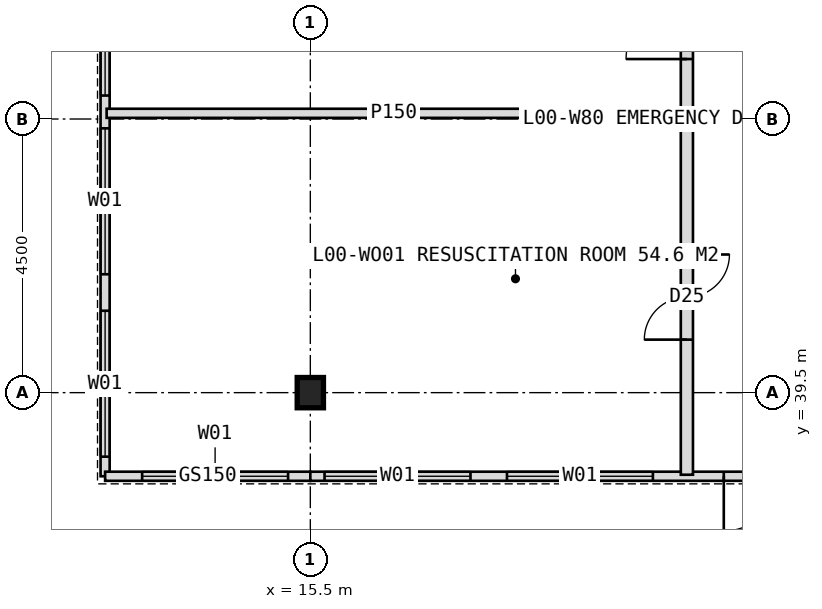
"""IFC4 building model, lengths in metres.
Left out: names, types, materials, properties, quantities, classifications, styles, units other than length and angle.
Written with IfcOpenShell. Run it as: python <this file> out.ifc"""

import sys

from ifc_helpers import new_model, si_unit, direction, frame, frame_2d, origin, origin_2d, place, context, subcontext, project, spatial, rectangle, i_section, extrude, element, fill, save


model = new_model("IFC4")
c1 = context("Model", 3, precision=1e-05, world=origin(), true_north=direction((0.0, 1.0)))
c2 = subcontext(c1, "Body", "Model", "MODEL_VIEW")
j1 = project(units=[si_unit("LENGTHUNIT", "METRE"), si_unit("PLANEANGLEUNIT", "RADIAN")], contexts=[c1])
p1 = place(None, origin())
s1 = spatial("IfcSite", under=j1, at=p1, CompositionType="ELEMENT")
p2 = place(p1, origin())
s2 = spatial("IfcBuilding", under=s1, at=p2, CompositionType="ELEMENT")
p3 = place(p2, origin())
s3 = spatial("IfcBuildingStorey", under=s2, at=p3, CompositionType="ELEMENT", Elevation=0.0)
p4 = place(p3, frame((15.5, 39.5, 0.0), z_axis=(0.0, 0.0, 1.0), x_axis=(1.0, 0.0, 0.0)))
e1 = element("IfcColumn", 1, at=p4, inside=s3, PredefinedType="COLUMN", context=c2, shape_type="SweptSolid", body=[
    extrude(i_section(OverallWidth=0.432, OverallDepth=0.498, WebThickness=0.056, FlangeThickness=0.089, FilletRadius=0.015, at=origin_2d()), origin(), (0.0, 0.0, 1.0), 6.0),
])
p5 = place(p3, frame((12.125, 85.875, 0.0), z_axis=(0.0, 0.0, 1.0), x_axis=(0.0, -1.0, 0.0)))
e2 = element("IfcWall", 2, at=p5, inside=s3, PredefinedType="STANDARD", context=c2, shape_type="SweptSolid", body=[
    extrude(rectangle(XDim=47.75, YDim=0.15, at=frame_2d((23.875, 0.0))), origin(), (0.0, 0.0, 1.0), 6.0),
])
p6 = place(p5, frame((22.7, 0.0, 0.0)))
e3 = element("IfcOpeningElement", 3, at=p6, cuts=e2, PredefinedType="OPENING", context=c2, shape_type="SweptSolid", body=[
    extrude(rectangle(XDim=2.4, YDim=2.7, at=frame_2d((1.2, 1.35))), frame((0.0, 0.085, 0.0), z_axis=(0.0, -1.0, 0.0), x_axis=(1.0, 0.0, 0.0)), (0.0, 0.0, 1.0), 0.17),
])
p7 = place(p5, frame((0.306, 0.0, 0.6)))
e4 = element("IfcOpeningElement", 4, at=p7, cuts=e2, PredefinedType="OPENING", context=c2, shape_type="SweptSolid", body=[
    extrude(rectangle(XDim=2.4, YDim=3.0, at=frame_2d((1.2, 1.5))), frame((0.0, 0.085, 0.0), z_axis=(0.0, -1.0, 0.0), x_axis=(1.0, 0.0, 0.0)), (0.0, 0.0, 1.0), 0.17),
])
p8 = place(p5, frame((3.306, 0.0, 0.6)))
e5 = element("IfcOpeningElement", 5, at=p8, cuts=e2, PredefinedType="OPENING", context=c2, shape_type="SweptSolid", body=[
    extrude(rectangle(XDim=2.4, YDim=3.0, at=frame_2d((1.2, 1.5))), frame((0.0, 0.085, 0.0), z_axis=(0.0, -1.0, 0.0), x_axis=(1.0, 0.0, 0.0)), (0.0, 0.0, 1.0), 0.17),
])
p9 = place(p5, frame((6.306, 0.0, 0.6)))
e6 = element("IfcOpeningElement", 6, at=p9, cuts=e2, PredefinedType="OPENING", context=c2, shape_type="SweptSolid", body=[
    extrude(rectangle(XDim=2.4, YDim=3.0, at=frame_2d((1.2, 1.5))), frame((0.0, 0.085, 0.0), z_axis=(0.0, -1.0, 0.0), x_axis=(1.0, 0.0, 0.0)), (0.0, 0.0, 1.0), 0.17),
])
p10 = place(p5, frame((9.306, 0.0, 0.6)))
e7 = element("IfcOpeningElement", 7, at=p10, cuts=e2, PredefinedType="OPENING", context=c2, shape_type="SweptSolid", body=[
    extrude(rectangle(XDim=2.4, YDim=3.0, at=frame_2d((1.2, 1.5))), frame((0.0, 0.085, 0.0), z_axis=(0.0, -1.0, 0.0), x_axis=(1.0, 0.0, 0.0)), (0.0, 0.0, 1.0), 0.17),
])
p11 = place(p5, frame((12.222, 0.0, 0.6)))
e8 = element("IfcOpeningElement", 8, at=p11, cuts=e2, PredefinedType="OPENING", context=c2, shape_type="SweptSolid", body=[
    extrude(rectangle(XDim=2.4, YDim=3.0, at=frame_2d((1.2, 1.5))), frame((0.0, 0.085, 0.0), z_axis=(0.0, -1.0, 0.0), x_axis=(1.0, 0.0, 0.0)), (0.0, 0.0, 1.0), 0.17),
])
p12 = place(p5, frame((15.222, 0.0, 0.6)))
e9 = element("IfcOpeningElement", 9, at=p12, cuts=e2, PredefinedType="OPENING", context=c2, shape_type="SweptSolid", body=[
    extrude(rectangle(XDim=2.4, YDim=3.0, at=frame_2d((1.2, 1.5))), frame((0.0, 0.085, 0.0), z_axis=(0.0, -1.0, 0.0), x_axis=(1.0, 0.0, 0.0)), (0.0, 0.0, 1.0), 0.17),
])
p13 = place(p5, frame((18.198, 0.0, 0.6)))
e10 = element("IfcOpeningElement", 10, at=p13, cuts=e2, PredefinedType="OPENING", context=c2, shape_type="SweptSolid", body=[
    extrude(rectangle(XDim=2.4, YDim=3.0, at=frame_2d((1.2, 1.5))), frame((0.0, 0.085, 0.0), z_axis=(0.0, -1.0, 0.0), x_axis=(1.0, 0.0, 0.0)), (0.0, 0.0, 1.0), 0.17),
])
p14 = place(p5, frame((27.131, 0.0, 0.6)))
e11 = element("IfcOpeningElement", 11, at=p14, cuts=e2, PredefinedType="OPENING", context=c2, shape_type="SweptSolid", body=[
    extrude(rectangle(XDim=2.4, YDim=3.0, at=frame_2d((1.2, 1.5))), frame((0.0, 0.085, 0.0), z_axis=(0.0, -1.0, 0.0), x_axis=(1.0, 0.0, 0.0)), (0.0, 0.0, 1.0), 0.17),
])
p15 = place(p5, frame((30.131, 0.0, 0.6)))
e12 = element("IfcOpeningElement", 12, at=p15, cuts=e2, PredefinedType="OPENING", context=c2, shape_type="SweptSolid", body=[
    extrude(rectangle(XDim=2.4, YDim=3.0, at=frame_2d((1.2, 1.5))), frame((0.0, 0.085, 0.0), z_axis=(0.0, -1.0, 0.0), x_axis=(1.0, 0.0, 0.0)), (0.0, 0.0, 1.0), 0.17),
])
p16 = place(p5, frame((33.125, 0.0, 0.6)))
e13 = element("IfcOpeningElement", 13, at=p16, cuts=e2, PredefinedType="OPENING", context=c2, shape_type="SweptSolid", body=[
    extrude(rectangle(XDim=2.4, YDim=3.0, at=frame_2d((1.2, 1.5))), frame((0.0, 0.085, 0.0), z_axis=(0.0, -1.0, 0.0), x_axis=(1.0, 0.0, 0.0)), (0.0, 0.0, 1.0), 0.17),
])
p17 = place(p5, frame((36.125, 0.0, 0.6)))
e14 = element("IfcOpeningElement", 14, at=p17, cuts=e2, PredefinedType="OPENING", context=c2, shape_type="SweptSolid", body=[
    extrude(rectangle(XDim=2.4, YDim=3.0, at=frame_2d((1.2, 1.5))), frame((0.0, 0.085, 0.0), z_axis=(0.0, -1.0, 0.0), x_axis=(1.0, 0.0, 0.0)), (0.0, 0.0, 1.0), 0.17),
])
p18 = place(p5, frame((39.089, 0.0, 0.6)))
e15 = element("IfcOpeningElement", 15, at=p18, cuts=e2, PredefinedType="OPENING", context=c2, shape_type="SweptSolid", body=[
    extrude(rectangle(XDim=2.4, YDim=3.0, at=frame_2d((1.2, 1.5))), frame((0.0, 0.085, 0.0), z_axis=(0.0, -1.0, 0.0), x_axis=(1.0, 0.0, 0.0)), (0.0, 0.0, 1.0), 0.17),
])
p19 = place(p5, frame((42.028, 0.0, 0.6)))
e16 = element("IfcOpeningElement", 16, at=p19, cuts=e2, PredefinedType="OPENING", context=c2, shape_type="SweptSolid", body=[
    extrude(rectangle(XDim=2.4, YDim=3.0, at=frame_2d((1.2, 1.5))), frame((0.0, 0.085, 0.0), z_axis=(0.0, -1.0, 0.0), x_axis=(1.0, 0.0, 0.0)), (0.0, 0.0, 1.0), 0.17),
])
p20 = place(p5, frame((45.028, 0.0, 0.6)))
e17 = element("IfcOpeningElement", 17, at=p20, cuts=e2, PredefinedType="OPENING", context=c2, shape_type="SweptSolid", body=[
    extrude(rectangle(XDim=2.4, YDim=3.0, at=frame_2d((1.2, 1.5))), frame((0.0, 0.085, 0.0), z_axis=(0.0, -1.0, 0.0), x_axis=(1.0, 0.0, 0.0)), (0.0, 0.0, 1.0), 0.17),
])
p21 = place(p3, frame((12.125, 38.125, 0.0), z_axis=(0.0, 0.0, 1.0), x_axis=(1.0, 0.0, 0.0)))
e18 = element("IfcWall", 18, at=p21, inside=s3, PredefinedType="STANDARD", context=c2, shape_type="SweptSolid", body=[
    extrude(rectangle(XDim=3.375, YDim=0.15, at=frame_2d((1.688, 0.0))), origin(), (0.0, 0.0, 1.0), 6.0),
])
p22 = place(p21, frame((0.609, 0.0, 0.6)))
e19 = element("IfcOpeningElement", 19, at=p22, cuts=e18, PredefinedType="OPENING", context=c2, shape_type="SweptSolid", body=[
    extrude(rectangle(XDim=2.4, YDim=3.0, at=frame_2d((1.2, 1.5))), frame((0.0, 0.085, 0.0), z_axis=(0.0, -1.0, 0.0), x_axis=(1.0, 0.0, 0.0)), (0.0, 0.0, 1.0), 0.17),
])
p23 = place(p3, frame((15.5, 38.125, 0.0), z_axis=(0.0, 0.0, 1.0), x_axis=(1.0, 0.0, 0.0)))
e20 = element("IfcWall", 20, at=p23, inside=s3, PredefinedType="STANDARD", context=c2, shape_type="SweptSolid", body=[
    extrude(rectangle(XDim=18.0, YDim=0.15, at=frame_2d((9.0, 0.0))), origin(), (0.0, 0.0, 1.0), 5.1),
])
p24 = place(p23, frame((6.8, 0.0, 0.0)))
e21 = element("IfcOpeningElement", 21, at=p24, cuts=e20, PredefinedType="OPENING", context=c2, shape_type="SweptSolid", body=[
    extrude(rectangle(XDim=1.8, YDim=2.4, at=frame_2d((0.9, 1.2))), frame((0.0, 0.085, 0.0), z_axis=(0.0, -1.0, 0.0), x_axis=(1.0, 0.0, 0.0)), (0.0, 0.0, 1.0), 0.17),
])
p25 = place(p23, frame((0.234, 0.0, 0.6)))
e22 = element("IfcOpeningElement", 22, at=p25, cuts=e20, PredefinedType="OPENING", context=c2, shape_type="SweptSolid", body=[
    extrude(rectangle(XDim=2.4, YDim=3.0, at=frame_2d((1.2, 1.5))), frame((0.0, 0.085, 0.0), z_axis=(0.0, -1.0, 0.0), x_axis=(1.0, 0.0, 0.0)), (0.0, 0.0, 1.0), 0.17),
])
p26 = place(p23, frame((3.234, 0.0, 0.6)))
e23 = element("IfcOpeningElement", 23, at=p26, cuts=e20, PredefinedType="OPENING", context=c2, shape_type="SweptSolid", body=[
    extrude(rectangle(XDim=2.4, YDim=3.0, at=frame_2d((1.2, 1.5))), frame((0.0, 0.085, 0.0), z_axis=(0.0, -1.0, 0.0), x_axis=(1.0, 0.0, 0.0)), (0.0, 0.0, 1.0), 0.17),
])
p27 = place(p23, frame((15.279, 0.0, 0.6)))
e24 = element("IfcOpeningElement", 24, at=p27, cuts=e20, PredefinedType="OPENING", context=c2, shape_type="SweptSolid", body=[
    extrude(rectangle(XDim=2.4, YDim=3.0, at=frame_2d((1.2, 1.5))), frame((0.0, 0.085, 0.0), z_axis=(0.0, -1.0, 0.0), x_axis=(1.0, 0.0, 0.0)), (0.0, 0.0, 1.0), 0.17),
])
p28 = place(p3, frame((21.693, 38.15, 0.0), z_axis=(0.0, 0.0, 1.0), x_axis=(0.0, 1.0, 0.0)))
e25 = element("IfcWall", 25, at=p28, inside=s3, PredefinedType="PARTITIONING", context=c2, shape_type="SweptSolid", body=[
    extrude(rectangle(XDim=47.7, YDim=0.2, at=frame_2d((23.85, 0.0))), origin(), (0.0, 0.0, 1.0), 5.7),
])
p29 = place(p28, frame((45.7, 0.0, 0.0)))
e26 = element("IfcOpeningElement", 26, at=p29, cuts=e25, PredefinedType="OPENING", context=c2, shape_type="SweptSolid", body=[
    extrude(rectangle(XDim=1.2, YDim=2.1, at=frame_2d((0.6, 1.05))), frame((0.0, 0.11, 0.0), z_axis=(0.0, -1.0, 0.0), x_axis=(1.0, 0.0, 0.0)), (0.0, 0.0, 1.0), 0.22),
])
p30 = place(p28, frame((36.244, 0.0, 0.0)))
e27 = element("IfcOpeningElement", 27, at=p30, cuts=e25, PredefinedType="OPENING", context=c2, shape_type="SweptSolid", body=[
    extrude(rectangle(XDim=1.0, YDim=2.1, at=frame_2d((0.5, 1.05))), frame((0.0, 0.11, 0.0), z_axis=(0.0, -1.0, 0.0), x_axis=(1.0, 0.0, 0.0)), (0.0, 0.0, 1.0), 0.22),
])
p31 = place(p28, frame((2.222, 0.0, 0.0)))
e28 = element("IfcOpeningElement", 28, at=p31, cuts=e25, PredefinedType="OPENING", context=c2, shape_type="SweptSolid", body=[
    extrude(rectangle(XDim=1.4, YDim=2.2, at=frame_2d((0.7, 1.1))), frame((0.0, 0.11, 0.0), z_axis=(0.0, -1.0, 0.0), x_axis=(1.0, 0.0, 0.0)), (0.0, 0.0, 1.0), 0.22),
])
p32 = place(p28, frame((6.836, 0.0, 0.0)))
e29 = element("IfcOpeningElement", 29, at=p32, cuts=e25, PredefinedType="OPENING", context=c2, shape_type="SweptSolid", body=[
    extrude(rectangle(XDim=1.0, YDim=2.1, at=frame_2d((0.5, 1.05))), frame((0.0, 0.11, 0.0), z_axis=(0.0, -1.0, 0.0), x_axis=(1.0, 0.0, 0.0)), (0.0, 0.0, 1.0), 0.22),
])
p33 = place(p28, frame((11.113, 0.0, 0.0)))
e30 = element("IfcOpeningElement", 30, at=p33, cuts=e25, PredefinedType="OPENING", context=c2, shape_type="SweptSolid", body=[
    extrude(rectangle(XDim=1.4, YDim=2.2, at=frame_2d((0.7, 1.1))), frame((0.0, 0.11, 0.0), z_axis=(0.0, -1.0, 0.0), x_axis=(1.0, 0.0, 0.0)), (0.0, 0.0, 1.0), 0.22),
])
p34 = place(p28, frame((17.081, 0.0, 0.0)))
e31 = element("IfcOpeningElement", 31, at=p34, cuts=e25, PredefinedType="OPENING", context=c2, shape_type="SweptSolid", body=[
    extrude(rectangle(XDim=1.4, YDim=2.2, at=frame_2d((0.7, 1.1))), frame((0.0, 0.11, 0.0), z_axis=(0.0, -1.0, 0.0), x_axis=(1.0, 0.0, 0.0)), (0.0, 0.0, 1.0), 0.22),
])
p35 = place(p28, frame((23.05, 0.0, 0.0)))
e32 = element("IfcOpeningElement", 32, at=p35, cuts=e25, PredefinedType="OPENING", context=c2, shape_type="SweptSolid", body=[
    extrude(rectangle(XDim=1.4, YDim=2.2, at=frame_2d((0.7, 1.1))), frame((0.0, 0.11, 0.0), z_axis=(0.0, -1.0, 0.0), x_axis=(1.0, 0.0, 0.0)), (0.0, 0.0, 1.0), 0.22),
])
p36 = place(p28, frame((27.527, 0.0, 0.0)))
e33 = element("IfcOpeningElement", 33, at=p36, cuts=e25, PredefinedType="OPENING", context=c2, shape_type="SweptSolid", body=[
    extrude(rectangle(XDim=1.4, YDim=2.2, at=frame_2d((0.7, 1.1))), frame((0.0, 0.11, 0.0), z_axis=(0.0, -1.0, 0.0), x_axis=(1.0, 0.0, 0.0)), (0.0, 0.0, 1.0), 0.22),
])
p37 = place(p28, frame((32.203, 0.0, 0.0)))
e34 = element("IfcOpeningElement", 34, at=p37, cuts=e25, PredefinedType="OPENING", context=c2, shape_type="SweptSolid", body=[
    extrude(rectangle(XDim=1.0, YDim=2.1, at=frame_2d((0.5, 1.05))), frame((0.0, 0.11, 0.0), z_axis=(0.0, -1.0, 0.0), x_axis=(1.0, 0.0, 0.0)), (0.0, 0.0, 1.0), 0.22),
])
p38 = place(p3, frame((12.15, 44.094, 0.0), z_axis=(0.0, 0.0, 1.0), x_axis=(1.0, 0.0, 0.0)))
e35 = element("IfcWall", 35, at=p38, inside=s3, PredefinedType="PARTITIONING", context=c2, shape_type="SweptSolid", body=[
    extrude(rectangle(XDim=9.443, YDim=0.15, at=frame_2d((4.722, 0.0))), origin(), (0.0, 0.0, 1.0), 5.7),
])
p39 = place(p18, origin())
e36 = element("IfcWindow", 36, at=p39, inside=s3, PartitioningType="SINGLE_PANEL", PredefinedType="WINDOW", context=c2, shape_type="SweptSolid", body=[
    extrude(rectangle(XDim=2.4, YDim=3.0, at=frame_2d((1.2, 1.5))), frame((0.0, 0.03, 0.0), z_axis=(0.0, -1.0, 0.0), x_axis=(1.0, 0.0, 0.0)), (0.0, 0.0, 1.0), 0.06),
])
fill(e15, e36)
p40 = place(p19, origin())
e37 = element("IfcWindow", 37, at=p40, inside=s3, PartitioningType="SINGLE_PANEL", PredefinedType="WINDOW", context=c2, shape_type="SweptSolid", body=[
    extrude(rectangle(XDim=2.4, YDim=3.0, at=frame_2d((1.2, 1.5))), frame((0.0, 0.03, 0.0), z_axis=(0.0, -1.0, 0.0), x_axis=(1.0, 0.0, 0.0)), (0.0, 0.0, 1.0), 0.06),
])
fill(e16, e37)
p41 = place(p20, origin())
e38 = element("IfcWindow", 38, at=p41, inside=s3, PartitioningType="SINGLE_PANEL", PredefinedType="WINDOW", context=c2, shape_type="SweptSolid", body=[
    extrude(rectangle(XDim=2.4, YDim=3.0, at=frame_2d((1.2, 1.5))), frame((0.0, 0.03, 0.0), z_axis=(0.0, -1.0, 0.0), x_axis=(1.0, 0.0, 0.0)), (0.0, 0.0, 1.0), 0.06),
])
fill(e17, e38)
p42 = place(p24, frame((1.8, 0.0, 0.0), z_axis=(0.0, 0.0, 1.0), x_axis=(-1.0, 0.0, 0.0)))
e39 = element("IfcDoor", 39, at=p42, inside=s3, OperationType="DOUBLE_DOOR_SINGLE_SWING", PredefinedType="DOOR", context=c2, shape_type="SweptSolid", body=[
    extrude(rectangle(XDim=1.8, YDim=2.4, at=frame_2d((0.9, 1.2))), frame((0.0, 0.025, 0.0), z_axis=(0.0, -1.0, 0.0), x_axis=(1.0, 0.0, 0.0)), (0.0, 0.0, 1.0), 0.05),
])
fill(e21, e39)
p43 = place(p22, origin())
e40 = element("IfcWindow", 40, at=p43, inside=s3, PartitioningType="SINGLE_PANEL", PredefinedType="WINDOW", context=c2, shape_type="SweptSolid", body=[
    extrude(rectangle(XDim=2.4, YDim=3.0, at=frame_2d((1.2, 1.5))), frame((0.0, 0.03, 0.0), z_axis=(0.0, -1.0, 0.0), x_axis=(1.0, 0.0, 0.0)), (0.0, 0.0, 1.0), 0.06),
])
fill(e19, e40)
p44 = place(p25, origin())
e41 = element("IfcWindow", 41, at=p44, inside=s3, PartitioningType="SINGLE_PANEL", PredefinedType="WINDOW", context=c2, shape_type="SweptSolid", body=[
    extrude(rectangle(XDim=2.4, YDim=3.0, at=frame_2d((1.2, 1.5))), frame((0.0, 0.03, 0.0), z_axis=(0.0, -1.0, 0.0), x_axis=(1.0, 0.0, 0.0)), (0.0, 0.0, 1.0), 0.06),
])
fill(e22, e41)
p45 = place(p26, origin())
e42 = element("IfcWindow", 42, at=p45, inside=s3, PartitioningType="SINGLE_PANEL", PredefinedType="WINDOW", context=c2, shape_type="SweptSolid", body=[
    extrude(rectangle(XDim=2.4, YDim=3.0, at=frame_2d((1.2, 1.5))), frame((0.0, 0.03, 0.0), z_axis=(0.0, -1.0, 0.0), x_axis=(1.0, 0.0, 0.0)), (0.0, 0.0, 1.0), 0.06),
])
fill(e23, e42)
p46 = place(p31, origin())
e43 = element("IfcDoor", 43, at=p46, inside=s3, OperationType="DOUBLE_DOOR_SINGLE_SWING", PredefinedType="DOOR", context=c2, shape_type="SweptSolid", body=[
    extrude(rectangle(XDim=1.4, YDim=2.2, at=frame_2d((0.7, 1.1))), frame((0.0, 0.025, 0.0), z_axis=(0.0, -1.0, 0.0), x_axis=(1.0, 0.0, 0.0)), (0.0, 0.0, 1.0), 0.05),
])
fill(e28, e43)
p47 = place(p32, origin())
e44 = element("IfcDoor", 44, at=p47, inside=s3, OperationType="SINGLE_SWING_LEFT", PredefinedType="DOOR", context=c2, shape_type="SweptSolid", body=[
    extrude(rectangle(XDim=1.0, YDim=2.1, at=frame_2d((0.5, 1.05))), frame((0.0, 0.025, 0.0), z_axis=(0.0, -1.0, 0.0), x_axis=(1.0, 0.0, 0.0)), (0.0, 0.0, 1.0), 0.05),
])
fill(e29, e44)
save(model, sys.argv[1])
